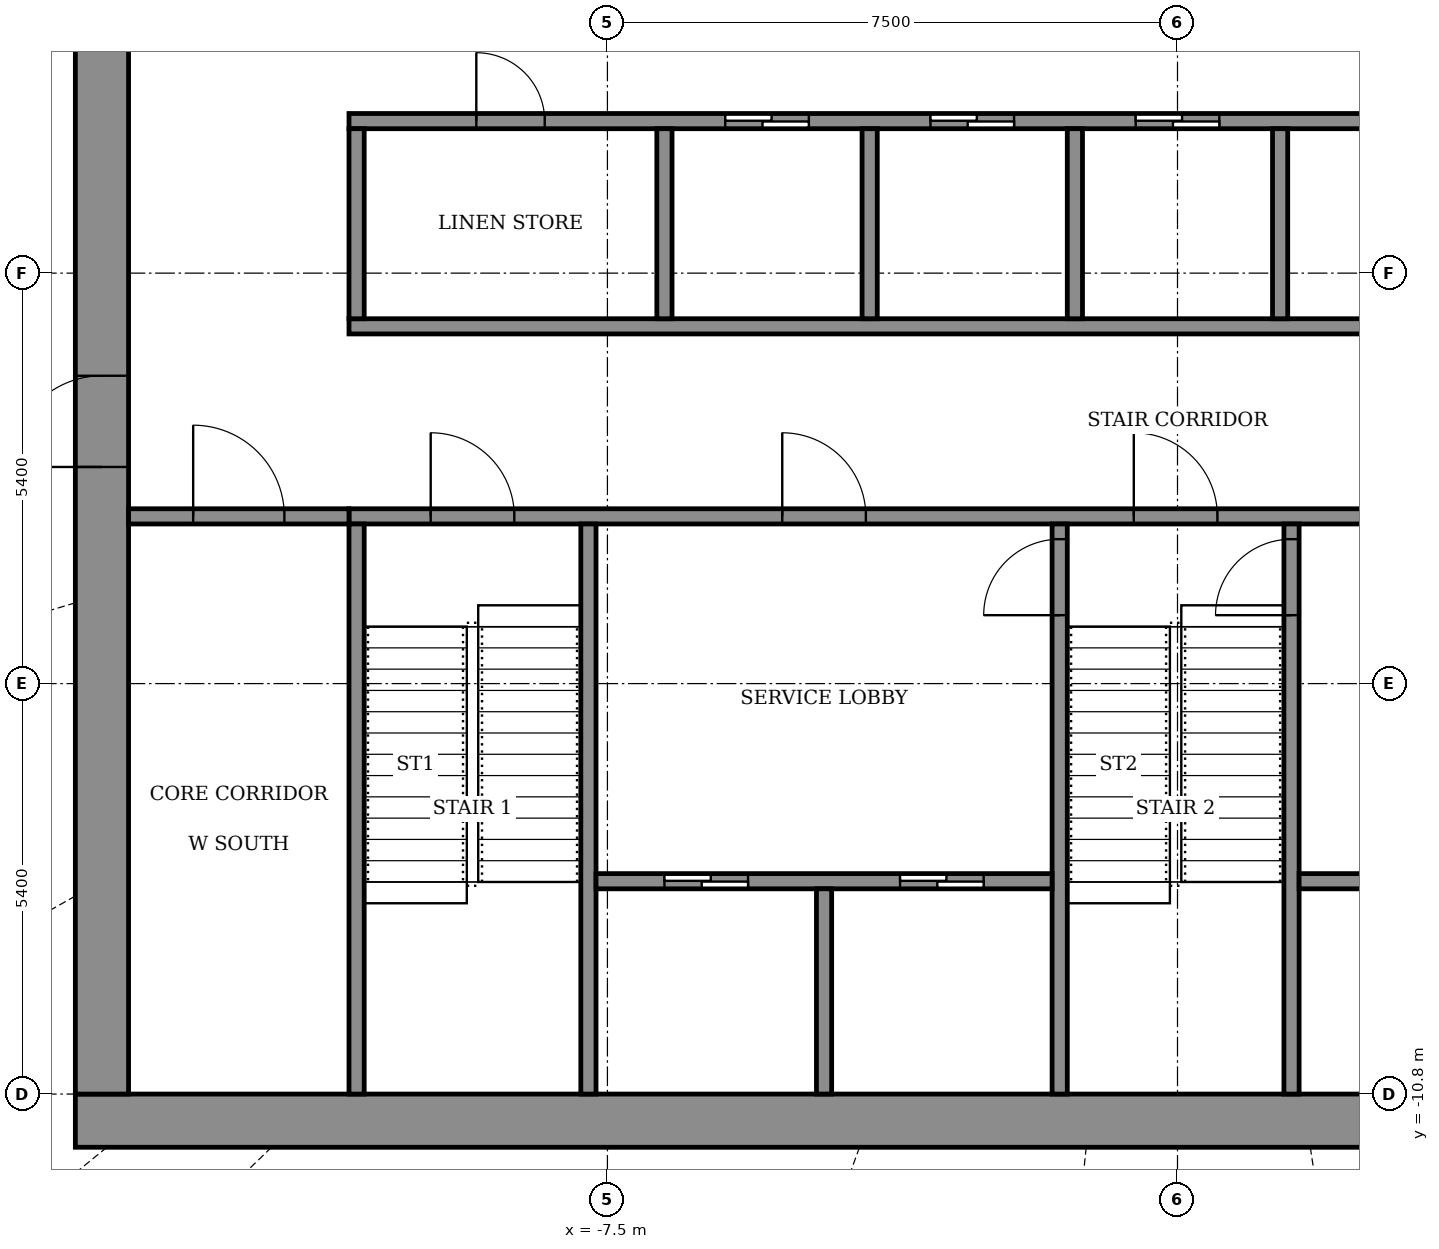
"""IFC4 building model, lengths in metres.
Left out: names, types, materials, properties, quantities, classifications, styles, units other than length and angle.
Written with IfcOpenShell. Run it as: python <this file> out.ifc"""

import sys

from ifc_helpers import new_model, si_unit, direction, frame, frame_2d, origin, place, context, subcontext, project, spatial, rectangle, extrude, element, fill, save


model = new_model("IFC4")
c1 = context("Model", 3, precision=1e-05, world=origin(), true_north=direction((0.0, 1.0)))
c2 = subcontext(c1, "Body", "Model", "MODEL_VIEW")
j1 = project(units=[si_unit("LENGTHUNIT", "METRE"), si_unit("PLANEANGLEUNIT", "RADIAN")], contexts=[c1])
p1 = place(None, origin())
s1 = spatial("IfcSite", under=j1, at=p1, CompositionType="ELEMENT")
p2 = place(p1, origin())
s2 = spatial("IfcBuilding", under=s1, at=p2, CompositionType="ELEMENT")
p3 = place(p2, frame((0.0, 0.0, 252.7)))
s3 = spatial("IfcBuildingStorey", under=s2, at=p3, CompositionType="ELEMENT", Elevation=252.7)
p4 = place(p3, frame((-14.5, -11.15, 0.0), z_axis=(0.0, 0.0, 1.0), x_axis=(1.0, 0.0, 0.0)))
e1 = element("IfcWall", 1, at=p4, inside=s3, PredefinedType="SHEAR", context=c2, shape_type="SweptSolid", body=[
    extrude(rectangle(XDim=29.0, YDim=0.7, at=frame_2d((14.5, 0.0))), origin(), (0.0, 0.0, 1.0), 4.6),
])
p5 = place(p3, frame((-14.15, -10.8, 0.0), z_axis=(0.0, 0.0, 1.0), x_axis=(0.0, 1.0, 0.0)))
e2 = element("IfcWall", 2, at=p5, inside=s3, PredefinedType="SHEAR", context=c2, shape_type="SweptSolid", body=[
    extrude(rectangle(XDim=21.6, YDim=0.7, at=frame_2d((10.8, 0.0))), origin(), (0.0, 0.0, 1.0), 4.6),
])
p6 = place(p5, frame((8.25, 0.0, 0.0)))
e3 = element("IfcOpeningElement", 3, at=p6, cuts=e2, PredefinedType="OPENING", context=c2, shape_type="SweptSolid", body=[
    extrude(rectangle(XDim=1.2, YDim=2.1, at=frame_2d((0.6, 1.05))), frame((0.0, 0.36, 0.0), z_axis=(0.0, -1.0, 0.0), x_axis=(1.0, 0.0, 0.0)), (0.0, 0.0, 1.0), 0.72),
])
p7 = place(p5, frame((15.25, 0.0, 0.0)))
e4 = element("IfcOpeningElement", 4, at=p7, cuts=e2, PredefinedType="OPENING", context=c2, shape_type="SweptSolid", body=[
    extrude(rectangle(XDim=1.2, YDim=2.1, at=frame_2d((0.6, 1.05))), frame((0.0, 0.36, 0.0), z_axis=(0.0, -1.0, 0.0), x_axis=(1.0, 0.0, 0.0)), (0.0, 0.0, 1.0), 0.72),
])
p8 = place(p3, frame((-10.9, -3.2, 0.0), z_axis=(0.0, 0.0, 1.0), x_axis=(1.0, 0.0, 0.0)))
e5 = element("IfcWall", 5, at=p8, inside=s3, PredefinedType="SHEAR", context=c2, shape_type="SweptSolid", body=[
    extrude(rectangle(XDim=21.8, YDim=0.2, at=frame_2d((10.9, 0.0))), origin(), (0.0, 0.0, 1.0), 4.05),
])
p9 = place(p8, frame((1.075, 0.0, 0.0)))
e6 = element("IfcOpeningElement", 6, at=p9, cuts=e5, PredefinedType="OPENING", context=c2, shape_type="SweptSolid", body=[
    extrude(rectangle(XDim=1.1, YDim=2.1, at=frame_2d((0.55, 1.05))), frame((0.0, 0.11, 0.0), z_axis=(0.0, -1.0, 0.0), x_axis=(1.0, 0.0, 0.0)), (0.0, 0.0, 1.0), 0.22),
])
p10 = place(p8, frame((10.325, 0.0, 0.0)))
e7 = element("IfcOpeningElement", 7, at=p10, cuts=e5, PredefinedType="OPENING", context=c2, shape_type="SweptSolid", body=[
    extrude(rectangle(XDim=1.1, YDim=2.1, at=frame_2d((0.55, 1.05))), frame((0.0, 0.11, 0.0), z_axis=(0.0, -1.0, 0.0), x_axis=(1.0, 0.0, 0.0)), (0.0, 0.0, 1.0), 0.22),
])
p11 = place(p8, frame((19.625, 0.0, 0.0)))
e8 = element("IfcOpeningElement", 8, at=p11, cuts=e5, PredefinedType="OPENING", context=c2, shape_type="SweptSolid", body=[
    extrude(rectangle(XDim=1.1, YDim=2.1, at=frame_2d((0.55, 1.05))), frame((0.0, 0.11, 0.0), z_axis=(0.0, -1.0, 0.0), x_axis=(1.0, 0.0, 0.0)), (0.0, 0.0, 1.0), 0.22),
])
p12 = place(p8, frame((5.7, 0.0, 0.0)))
e9 = element("IfcOpeningElement", 9, at=p12, cuts=e5, PredefinedType="OPENING", context=c2, shape_type="SweptSolid", body=[
    extrude(rectangle(XDim=1.1, YDim=2.1, at=frame_2d((0.55, 1.05))), frame((0.0, 0.11, 0.0), z_axis=(0.0, -1.0, 0.0), x_axis=(1.0, 0.0, 0.0)), (0.0, 0.0, 1.0), 0.22),
])
p13 = place(p8, frame((14.975, 0.0, 0.0)))
e10 = element("IfcOpeningElement", 10, at=p13, cuts=e5, PredefinedType="OPENING", context=c2, shape_type="SweptSolid", body=[
    extrude(rectangle(XDim=1.1, YDim=2.1, at=frame_2d((0.55, 1.05))), frame((0.0, 0.11, 0.0), z_axis=(0.0, -1.0, 0.0), x_axis=(1.0, 0.0, 0.0)), (0.0, 0.0, 1.0), 0.22),
])
p14 = place(p3, frame((-10.9, -0.7, 0.0), z_axis=(0.0, 0.0, 1.0), x_axis=(1.0, 0.0, 0.0)))
e11 = element("IfcWall", 11, at=p14, inside=s3, PredefinedType="SHEAR", context=c2, shape_type="SweptSolid", body=[
    extrude(rectangle(XDim=21.8, YDim=0.2, at=frame_2d((10.9, 0.0))), origin(), (0.0, 0.0, 1.0), 4.05),
])
p15 = place(p3, frame((-10.9, 2.0, 0.0), z_axis=(0.0, 0.0, 1.0), x_axis=(1.0, 0.0, 0.0)))
e12 = element("IfcWall", 12, at=p15, inside=s3, PredefinedType="SHEAR", context=c2, shape_type="SweptSolid", body=[
    extrude(rectangle(XDim=21.8, YDim=0.2, at=frame_2d((10.9, 0.0))), origin(), (0.0, 0.0, 1.0), 4.05),
])
p16 = place(p15, frame((4.95, 0.0, 0.0)))
e13 = element("IfcOpeningElement", 13, at=p16, cuts=e12, PredefinedType="OPENING", context=c2, shape_type="SweptSolid", body=[
    extrude(rectangle(XDim=1.1, YDim=2.1, at=frame_2d((0.55, 1.05))), frame((0.0, 0.11, 0.0), z_axis=(0.0, -1.0, 0.0), x_axis=(1.0, 0.0, 0.0)), (0.0, 0.0, 1.0), 0.22),
])
p17 = place(p15, frame((7.65, 0.0, 0.0)))
e14 = element("IfcOpeningElement", 14, at=p17, cuts=e12, PredefinedType="OPENING", context=c2, shape_type="SweptSolid", body=[
    extrude(rectangle(XDim=1.1, YDim=2.1, at=frame_2d((0.55, 1.05))), frame((0.0, 0.11, 0.0), z_axis=(0.0, -1.0, 0.0), x_axis=(1.0, 0.0, 0.0)), (0.0, 0.0, 1.0), 0.22),
])
p18 = place(p15, frame((10.35, 0.0, 0.0)))
e15 = element("IfcOpeningElement", 15, at=p18, cuts=e12, PredefinedType="OPENING", context=c2, shape_type="SweptSolid", body=[
    extrude(rectangle(XDim=1.1, YDim=2.1, at=frame_2d((0.55, 1.05))), frame((0.0, 0.11, 0.0), z_axis=(0.0, -1.0, 0.0), x_axis=(1.0, 0.0, 0.0)), (0.0, 0.0, 1.0), 0.22),
])
p19 = place(p15, frame((1.675, 0.0, 0.0)))
e16 = element("IfcOpeningElement", 16, at=p19, cuts=e12, PredefinedType="OPENING", context=c2, shape_type="SweptSolid", body=[
    extrude(rectangle(XDim=0.9, YDim=2.1, at=frame_2d((0.45, 1.05))), frame((0.0, 0.11, 0.0), z_axis=(0.0, -1.0, 0.0), x_axis=(1.0, 0.0, 0.0)), (0.0, 0.0, 1.0), 0.22),
])
p20 = place(p15, frame((16.525, 0.0, 0.0)))
e17 = element("IfcOpeningElement", 17, at=p20, cuts=e12, PredefinedType="OPENING", context=c2, shape_type="SweptSolid", body=[
    extrude(rectangle(XDim=0.9, YDim=2.1, at=frame_2d((0.45, 1.05))), frame((0.0, 0.11, 0.0), z_axis=(0.0, -1.0, 0.0), x_axis=(1.0, 0.0, 0.0)), (0.0, 0.0, 1.0), 0.22),
])
for number, where, z_axis, x_axis in (
    (18, (-10.8, -10.8, 0.0), (0.0, 0.0, 1.0), (0.0, 1.0, 0.0)),
    (19, (-7.75, -10.8, 0.0), (0.0, 0.0, 1.0), (0.0, 1.0, 0.0)),
):
    element("IfcWall", number, at=place(p3, frame(where, z_axis=z_axis, x_axis=x_axis)), inside=s3, PredefinedType="SHEAR", context=c2, shape_type="SweptSolid", body=[
        extrude(rectangle(XDim=7.5, YDim=0.2, at=frame_2d((3.75, 0.0))), origin(), (0.0, 0.0, 1.0), 4.05),
    ])
p21 = place(p3, frame((-1.55, -10.8, 0.0), z_axis=(0.0, 0.0, 1.0), x_axis=(0.0, 1.0, 0.0)))
e20 = element("IfcWall", 20, at=p21, inside=s3, PredefinedType="SHEAR", context=c2, shape_type="SweptSolid", body=[
    extrude(rectangle(XDim=7.5, YDim=0.2, at=frame_2d((3.75, 0.0))), origin(), (0.0, 0.0, 1.0), 4.05),
])
p22 = place(p21, frame((6.3, 0.0, 0.0)))
e21 = element("IfcOpeningElement", 21, at=p22, cuts=e20, PredefinedType="OPENING", context=c2, shape_type="SweptSolid", body=[
    extrude(rectangle(XDim=1.0, YDim=2.1, at=frame_2d((0.5, 1.05))), frame((0.0, 0.11, 0.0), z_axis=(0.0, -1.0, 0.0), x_axis=(1.0, 0.0, 0.0)), (0.0, 0.0, 1.0), 0.22),
])
p23 = place(p3, frame((1.5, -10.8, 0.0), z_axis=(0.0, 0.0, 1.0), x_axis=(0.0, 1.0, 0.0)))
e22 = element("IfcWall", 22, at=p23, inside=s3, PredefinedType="SHEAR", context=c2, shape_type="SweptSolid", body=[
    extrude(rectangle(XDim=7.5, YDim=0.2, at=frame_2d((3.75, 0.0))), origin(), (0.0, 0.0, 1.0), 4.05),
])
p24 = place(p23, frame((6.3, 0.0, 0.0)))
e23 = element("IfcOpeningElement", 23, at=p24, cuts=e22, PredefinedType="OPENING", context=c2, shape_type="SweptSolid", body=[
    extrude(rectangle(XDim=1.0, YDim=2.1, at=frame_2d((0.5, 1.05))), frame((0.0, 0.11, 0.0), z_axis=(0.0, -1.0, 0.0), x_axis=(1.0, 0.0, 0.0)), (0.0, 0.0, 1.0), 0.22),
])
p25 = place(p3, frame((-7.65, -8.0, 0.0), z_axis=(0.0, 0.0, 1.0), x_axis=(1.0, 0.0, 0.0)))
e24 = element("IfcWall", 24, at=p25, inside=s3, PredefinedType="SHEAR", context=c2, shape_type="SweptSolid", body=[
    extrude(rectangle(XDim=6.0, YDim=0.2, at=frame_2d((3.0, 0.0))), origin(), (0.0, 0.0, 1.0), 4.05),
])
p26 = place(p25, frame((0.9, 0.0, 0.0)))
e25 = element("IfcOpeningElement", 25, at=p26, cuts=e24, PredefinedType="OPENING", context=c2, shape_type="SweptSolid", body=[
    extrude(rectangle(XDim=1.1, YDim=2.1, at=frame_2d((0.55, 1.05))), frame((0.0, 0.11, 0.0), z_axis=(0.0, -1.0, 0.0), x_axis=(1.0, 0.0, 0.0)), (0.0, 0.0, 1.0), 0.22),
])
p27 = place(p25, frame((4.0, 0.0, 0.0)))
e26 = element("IfcOpeningElement", 26, at=p27, cuts=e24, PredefinedType="OPENING", context=c2, shape_type="SweptSolid", body=[
    extrude(rectangle(XDim=1.1, YDim=2.1, at=frame_2d((0.55, 1.05))), frame((0.0, 0.11, 0.0), z_axis=(0.0, -1.0, 0.0), x_axis=(1.0, 0.0, 0.0)), (0.0, 0.0, 1.0), 0.22),
])
p28 = place(p3, frame((-4.65, -10.8, 0.0), z_axis=(0.0, 0.0, 1.0), x_axis=(0.0, 1.0, 0.0)))
e27 = element("IfcWall", 27, at=p28, inside=s3, PredefinedType="SHEAR", context=c2, shape_type="SweptSolid", body=[
    extrude(rectangle(XDim=2.7, YDim=0.2, at=frame_2d((1.35, 0.0))), origin(), (0.0, 0.0, 1.0), 4.05),
])
p29 = place(p3, frame((1.6, -8.0, 0.0), z_axis=(0.0, 0.0, 1.0), x_axis=(1.0, 0.0, 0.0)))
e28 = element("IfcWall", 28, at=p29, inside=s3, PredefinedType="SHEAR", context=c2, shape_type="SweptSolid", body=[
    extrude(rectangle(XDim=6.05, YDim=0.2, at=frame_2d((3.025, 0.0))), origin(), (0.0, 0.0, 1.0), 4.05),
])
p30 = place(p29, frame((0.913, 0.0, 0.0)))
e29 = element("IfcOpeningElement", 29, at=p30, cuts=e28, PredefinedType="OPENING", context=c2, shape_type="SweptSolid", body=[
    extrude(rectangle(XDim=1.1, YDim=2.1, at=frame_2d((0.55, 1.05))), frame((0.0, 0.11, 0.0), z_axis=(0.0, -1.0, 0.0), x_axis=(1.0, 0.0, 0.0)), (0.0, 0.0, 1.0), 0.22),
])
p31 = place(p29, frame((4.038, 0.0, 0.0)))
e30 = element("IfcOpeningElement", 30, at=p31, cuts=e28, PredefinedType="OPENING", context=c2, shape_type="SweptSolid", body=[
    extrude(rectangle(XDim=1.1, YDim=2.1, at=frame_2d((0.55, 1.05))), frame((0.0, 0.11, 0.0), z_axis=(0.0, -1.0, 0.0), x_axis=(1.0, 0.0, 0.0)), (0.0, 0.0, 1.0), 0.22),
])
p32 = place(p3, frame((-10.8, -0.6, 0.0), z_axis=(0.0, 0.0, 1.0), x_axis=(0.0, 1.0, 0.0)))
e31 = element("IfcWall", 31, at=p32, inside=s3, PredefinedType="STANDARD", context=c2, shape_type="SweptSolid", body=[
    extrude(rectangle(XDim=2.5, YDim=0.2, at=frame_2d((1.25, 0.0))), origin(), (0.0, 0.0, 1.0), 4.05),
])
for number, where, z_axis, x_axis in (
    (32, (-6.75, -0.6, 0.0), (0.0, 0.0, 1.0), (0.0, 1.0, 0.0)),
    (33, (-4.05, -0.6, 0.0), (0.0, 0.0, 1.0), (0.0, 1.0, 0.0)),
    (34, (-1.35, -0.6, 0.0), (0.0, 0.0, 1.0), (0.0, 1.0, 0.0)),
    (35, (1.35, -0.6, 0.0), (0.0, 0.0, 1.0), (0.0, 1.0, 0.0)),
):
    element("IfcWall", number, at=place(p3, frame(where, z_axis=z_axis, x_axis=x_axis)), inside=s3, PredefinedType="SHEAR", context=c2, shape_type="SweptSolid", body=[
        extrude(rectangle(XDim=2.5, YDim=0.2, at=frame_2d((1.25, 0.0))), origin(), (0.0, 0.0, 1.0), 4.05),
    ])
p33 = place(p3, frame((-13.8, -3.2, 0.0), z_axis=(0.0, 0.0, 1.0), x_axis=(1.0, 0.0, 0.0)))
e36 = element("IfcWall", 36, at=p33, inside=s3, PredefinedType="STANDARD", context=c2, shape_type="SweptSolid", body=[
    extrude(rectangle(XDim=2.9, YDim=0.2, at=frame_2d((1.45, 0.0))), origin(), (0.0, 0.0, 1.0), 4.05),
])
p34 = place(p33, frame((0.85, 0.0, 0.0)))
e37 = element("IfcOpeningElement", 37, at=p34, cuts=e36, PredefinedType="OPENING", context=c2, shape_type="SweptSolid", body=[
    extrude(rectangle(XDim=1.2, YDim=2.1, at=frame_2d((0.6, 1.05))), frame((0.0, 0.11, 0.0), z_axis=(0.0, -1.0, 0.0), x_axis=(1.0, 0.0, 0.0)), (0.0, 0.0, 1.0), 0.22),
])
p35 = place(p6, origin())
e38 = element("IfcDoor", 38, at=p35, inside=s3, OperationType="DOUBLE_DOOR_SINGLE_SWING", PredefinedType="DOOR", context=c2, shape_type="SweptSolid", body=[
    extrude(rectangle(XDim=1.2, YDim=2.1, at=frame_2d((0.6, 1.05))), frame((0.0, 0.025, 0.0), z_axis=(0.0, -1.0, 0.0), x_axis=(1.0, 0.0, 0.0)), (0.0, 0.0, 1.0), 0.05),
])
fill(e3, e38)
p36 = place(p16, origin())
e39 = element("IfcDoor", 39, at=p36, inside=s3, OperationType="SLIDING_TO_LEFT", PredefinedType="DOOR", context=c2, shape_type="SweptSolid", body=[
    extrude(rectangle(XDim=1.1, YDim=2.1, at=frame_2d((0.55, 1.05))), frame((0.0, 0.025, 0.0), z_axis=(0.0, -1.0, 0.0), x_axis=(1.0, 0.0, 0.0)), (0.0, 0.0, 1.0), 0.05),
])
fill(e13, e39)
p37 = place(p17, origin())
e40 = element("IfcDoor", 40, at=p37, inside=s3, OperationType="SLIDING_TO_LEFT", PredefinedType="DOOR", context=c2, shape_type="SweptSolid", body=[
    extrude(rectangle(XDim=1.1, YDim=2.1, at=frame_2d((0.55, 1.05))), frame((0.0, 0.025, 0.0), z_axis=(0.0, -1.0, 0.0), x_axis=(1.0, 0.0, 0.0)), (0.0, 0.0, 1.0), 0.05),
])
fill(e14, e40)
p38 = place(p18, origin())
e41 = element("IfcDoor", 41, at=p38, inside=s3, OperationType="SLIDING_TO_LEFT", PredefinedType="DOOR", context=c2, shape_type="SweptSolid", body=[
    extrude(rectangle(XDim=1.1, YDim=2.1, at=frame_2d((0.55, 1.05))), frame((0.0, 0.025, 0.0), z_axis=(0.0, -1.0, 0.0), x_axis=(1.0, 0.0, 0.0)), (0.0, 0.0, 1.0), 0.05),
])
fill(e15, e41)
p39 = place(p19, origin())
e42 = element("IfcDoor", 42, at=p39, inside=s3, OperationType="SINGLE_SWING_RIGHT", PredefinedType="DOOR", context=c2, shape_type="SweptSolid", body=[
    extrude(rectangle(XDim=0.9, YDim=2.1, at=frame_2d((0.45, 1.05))), frame((0.0, 0.025, 0.0), z_axis=(0.0, -1.0, 0.0), x_axis=(1.0, 0.0, 0.0)), (0.0, 0.0, 1.0), 0.05),
])
fill(e16, e42)
p40 = place(p26, origin())
e43 = element("IfcDoor", 43, at=p40, inside=s3, OperationType="SLIDING_TO_LEFT", PredefinedType="DOOR", context=c2, shape_type="SweptSolid", body=[
    extrude(rectangle(XDim=1.1, YDim=2.1, at=frame_2d((0.55, 1.05))), frame((0.0, 0.025, 0.0), z_axis=(0.0, -1.0, 0.0), x_axis=(1.0, 0.0, 0.0)), (0.0, 0.0, 1.0), 0.05),
])
fill(e25, e43)
p41 = place(p27, origin())
e44 = element("IfcDoor", 44, at=p41, inside=s3, OperationType="SLIDING_TO_LEFT", PredefinedType="DOOR", context=c2, shape_type="SweptSolid", body=[
    extrude(rectangle(XDim=1.1, YDim=2.1, at=frame_2d((0.55, 1.05))), frame((0.0, 0.025, 0.0), z_axis=(0.0, -1.0, 0.0), x_axis=(1.0, 0.0, 0.0)), (0.0, 0.0, 1.0), 0.05),
])
fill(e26, e44)
p42 = place(p9, origin())
e45 = element("IfcDoor", 45, at=p42, inside=s3, OperationType="SINGLE_SWING_RIGHT", PredefinedType="DOOR", context=c2, shape_type="SweptSolid", body=[
    extrude(rectangle(XDim=1.1, YDim=2.1, at=frame_2d((0.55, 1.05))), frame((0.0, 0.025, 0.0), z_axis=(0.0, -1.0, 0.0), x_axis=(1.0, 0.0, 0.0)), (0.0, 0.0, 1.0), 0.05),
])
fill(e6, e45)
p43 = place(p10, origin())
e46 = element("IfcDoor", 46, at=p43, inside=s3, OperationType="SINGLE_SWING_RIGHT", PredefinedType="DOOR", context=c2, shape_type="SweptSolid", body=[
    extrude(rectangle(XDim=1.1, YDim=2.1, at=frame_2d((0.55, 1.05))), frame((0.0, 0.025, 0.0), z_axis=(0.0, -1.0, 0.0), x_axis=(1.0, 0.0, 0.0)), (0.0, 0.0, 1.0), 0.05),
])
fill(e7, e46)
p44 = place(p12, origin())
e47 = element("IfcDoor", 47, at=p44, inside=s3, OperationType="SINGLE_SWING_LEFT", PredefinedType="DOOR", context=c2, shape_type="SweptSolid", body=[
    extrude(rectangle(XDim=1.1, YDim=2.1, at=frame_2d((0.55, 1.05))), frame((0.0, 0.025, 0.0), z_axis=(0.0, -1.0, 0.0), x_axis=(1.0, 0.0, 0.0)), (0.0, 0.0, 1.0), 0.05),
])
fill(e9, e47)
p45 = place(p22, origin())
e48 = element("IfcDoor", 48, at=p45, inside=s3, OperationType="SINGLE_SWING_RIGHT", PredefinedType="DOOR", context=c2, shape_type="SweptSolid", body=[
    extrude(rectangle(XDim=1.0, YDim=2.1, at=frame_2d((0.5, 1.05))), frame((0.0, 0.025, 0.0), z_axis=(0.0, -1.0, 0.0), x_axis=(1.0, 0.0, 0.0)), (0.0, 0.0, 1.0), 0.05),
])
fill(e21, e48)
p46 = place(p24, origin())
e49 = element("IfcDoor", 49, at=p46, inside=s3, OperationType="SINGLE_SWING_RIGHT", PredefinedType="DOOR", context=c2, shape_type="SweptSolid", body=[
    extrude(rectangle(XDim=1.0, YDim=2.1, at=frame_2d((0.5, 1.05))), frame((0.0, 0.025, 0.0), z_axis=(0.0, -1.0, 0.0), x_axis=(1.0, 0.0, 0.0)), (0.0, 0.0, 1.0), 0.05),
])
fill(e23, e49)
p47 = place(p34, origin())
e50 = element("IfcDoor", 50, at=p47, inside=s3, OperationType="SINGLE_SWING_LEFT", PredefinedType="DOOR", context=c2, shape_type="SweptSolid", body=[
    extrude(rectangle(XDim=1.2, YDim=2.1, at=frame_2d((0.6, 1.05))), frame((0.0, 0.025, 0.0), z_axis=(0.0, -1.0, 0.0), x_axis=(1.0, 0.0, 0.0)), (0.0, 0.0, 1.0), 0.05),
])
fill(e37, e50)
save(model, sys.argv[1])
